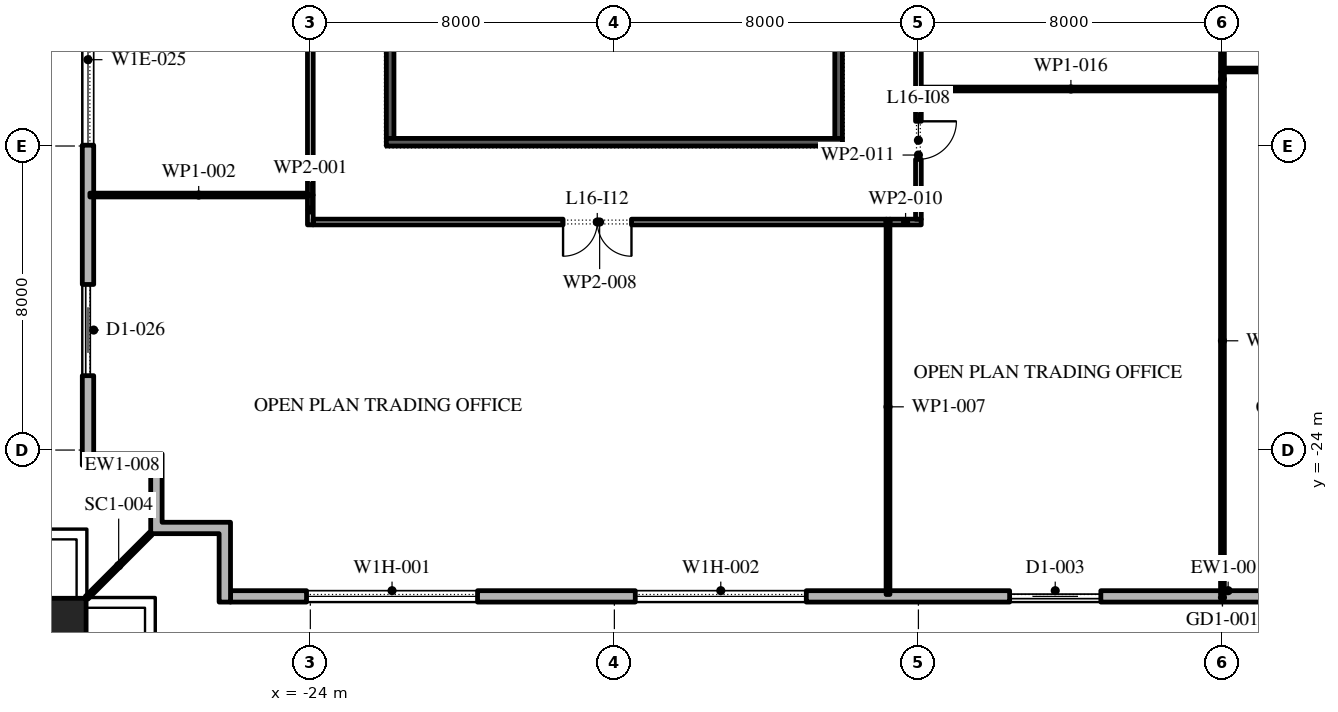
"""IFC4 building model, lengths in metres.
Left out: names, types, materials, properties, quantities, classifications, styles, units other than length and angle.
Written with IfcOpenShell. Run it as: python <this file> out.ifc"""

import sys

from ifc_helpers import new_model, si_unit, direction, frame, frame_2d, origin, origin_2d, place, context, subcontext, project, spatial, polyline, rectangle, outline, extrude, element, fill, save


model = new_model("IFC4")
c1 = context("Model", 3, precision=1e-05, world=origin(), true_north=direction((0.0, 1.0)))
c2 = subcontext(c1, "Body", "Model", "MODEL_VIEW")
j1 = project(units=[si_unit("LENGTHUNIT", "METRE"), si_unit("PLANEANGLEUNIT", "RADIAN")], contexts=[c1])
p1 = place(None, origin())
s1 = spatial("IfcSite", under=j1, at=p1, CompositionType="ELEMENT")
p2 = place(p1, origin())
s2 = spatial("IfcBuilding", under=s1, at=p2, CompositionType="ELEMENT")
p3 = place(p2, frame((0.0, 0.0, 77.4)))
s3 = spatial("IfcBuildingStorey", under=s2, at=p3, CompositionType="ELEMENT", Elevation=77.4)
p4 = place(p3, frame((-30.6, -28.6, 0.0), z_axis=(0.0, 0.0, 1.0), x_axis=(1.0, 0.0, 0.0)))
e1 = element("IfcColumn", 1, at=p4, inside=s3, PredefinedType="COLUMN", context=c2, shape_type="SweptSolid", body=[
    extrude(rectangle(XDim=1.4, YDim=1.4, at=origin_2d()), origin(), (0.0, 0.0, 1.0), 4.2),
])
p5 = place(p3, frame((-26.1, -27.85, 0.0), z_axis=(0.0, 0.0, 1.0), x_axis=(1.0, 0.0, 0.0)))
e2 = element("IfcWall", 2, at=p5, inside=s3, PredefinedType="STANDARD", context=c2, shape_type="SweptSolid", body=[
    extrude(rectangle(XDim=52.5, YDim=0.3, at=frame_2d((26.25, 0.0))), origin(), (0.0, 0.0, 1.0), 4.0),
])
p6 = place(p5, frame((2.0, 0.0, 0.45)))
e3 = element("IfcOpeningElement", 3, at=p6, cuts=e2, PredefinedType="OPENING", context=c2, shape_type="SweptSolid", body=[
    extrude(rectangle(XDim=4.5, YDim=2.75, at=frame_2d((2.25, 1.375))), frame((0.0, 0.16, 0.0), z_axis=(0.0, -1.0, 0.0), x_axis=(1.0, 0.0, 0.0)), (0.0, 0.0, 1.0), 0.32),
])
p7 = place(p5, frame((10.65, 0.0, 0.45)))
e4 = element("IfcOpeningElement", 4, at=p7, cuts=e2, PredefinedType="OPENING", context=c2, shape_type="SweptSolid", body=[
    extrude(rectangle(XDim=4.5, YDim=2.75, at=frame_2d((2.25, 1.375))), frame((0.0, 0.16, 0.0), z_axis=(0.0, -1.0, 0.0), x_axis=(1.0, 0.0, 0.0)), (0.0, 0.0, 1.0), 0.32),
])
p8 = place(p5, frame((20.5, 0.0, 0.0)))
e5 = element("IfcOpeningElement", 5, at=p8, cuts=e2, PredefinedType="OPENING", context=c2, shape_type="SweptSolid", body=[
    extrude(rectangle(XDim=2.4, YDim=3.5, at=frame_2d((1.2, 1.75))), frame((0.0, 0.16, 0.0), z_axis=(0.0, -1.0, 0.0), x_axis=(1.0, 0.0, 0.0)), (0.0, 0.0, 1.0), 0.32),
])
p9 = place(p5, frame((28.25, 0.0, 0.45)))
e6 = element("IfcOpeningElement", 6, at=p9, cuts=e2, PredefinedType="OPENING", context=c2, shape_type="SweptSolid", body=[
    extrude(rectangle(XDim=4.5, YDim=2.75, at=frame_2d((2.25, 1.375))), frame((0.0, 0.16, 0.0), z_axis=(0.0, -1.0, 0.0), x_axis=(1.0, 0.0, 0.0)), (0.0, 0.0, 1.0), 0.32),
])
p10 = place(p5, frame((37.05, 0.0, 0.45)))
e7 = element("IfcOpeningElement", 7, at=p10, cuts=e2, PredefinedType="OPENING", context=c2, shape_type="SweptSolid", body=[
    extrude(rectangle(XDim=4.5, YDim=2.75, at=frame_2d((2.25, 1.375))), frame((0.0, 0.16, 0.0), z_axis=(0.0, -1.0, 0.0), x_axis=(1.0, 0.0, 0.0)), (0.0, 0.0, 1.0), 0.32),
])
p11 = place(p5, frame((45.85, 0.0, 0.45)))
e8 = element("IfcOpeningElement", 8, at=p11, cuts=e2, PredefinedType="OPENING", context=c2, shape_type="SweptSolid", body=[
    extrude(rectangle(XDim=4.5, YDim=2.75, at=frame_2d((2.25, 1.375))), frame((0.0, 0.16, 0.0), z_axis=(0.0, -1.0, 0.0), x_axis=(1.0, 0.0, 0.0)), (0.0, 0.0, 1.0), 0.32),
])
p12 = place(p3, frame((-29.85, 25.1, 0.0), z_axis=(0.0, 0.0, 1.0), x_axis=(0.0, -1.0, 0.0)))
e9 = element("IfcWall", 9, at=p12, inside=s3, PredefinedType="STANDARD", context=c2, shape_type="SweptSolid", body=[
    extrude(rectangle(XDim=49.5, YDim=0.3, at=frame_2d((24.75, 0.0))), origin(), (0.0, 0.0, 1.0), 4.0),
])
p13 = place(p12, frame((1.157, 0.0, 0.45)))
e10 = element("IfcOpeningElement", 10, at=p13, cuts=e9, PredefinedType="OPENING", context=c2, shape_type="SweptSolid", body=[
    extrude(rectangle(XDim=4.5, YDim=2.875, at=frame_2d((2.25, 1.438))), frame((0.0, 0.16, 0.0), z_axis=(0.0, -1.0, 0.0), x_axis=(1.0, 0.0, 0.0)), (0.0, 0.0, 1.0), 0.32),
])
p14 = place(p12, frame((8.121, 0.0, 0.45)))
e11 = element("IfcOpeningElement", 11, at=p14, cuts=e9, PredefinedType="OPENING", context=c2, shape_type="SweptSolid", body=[
    extrude(rectangle(XDim=4.5, YDim=3.05, at=frame_2d((2.25, 1.525))), frame((0.0, 0.16, 0.0), z_axis=(0.0, -1.0, 0.0), x_axis=(1.0, 0.0, 0.0)), (0.0, 0.0, 1.0), 0.32),
])
p15 = place(p12, frame((16.286, 0.0, 0.0)))
e12 = element("IfcOpeningElement", 12, at=p15, cuts=e9, PredefinedType="OPENING", context=c2, shape_type="SweptSolid", body=[
    extrude(rectangle(XDim=2.4, YDim=3.325, at=frame_2d((1.2, 1.663))), frame((0.0, 0.16, 0.0), z_axis=(0.0, -1.0, 0.0), x_axis=(1.0, 0.0, 0.0)), (0.0, 0.0, 1.0), 0.32),
])
p16 = place(p12, frame((22.35, 0.0, 0.45)))
e13 = element("IfcOpeningElement", 13, at=p16, cuts=e9, PredefinedType="OPENING", context=c2, shape_type="SweptSolid", body=[
    extrude(rectangle(XDim=4.5, YDim=2.875, at=frame_2d((2.25, 1.438))), frame((0.0, 0.16, 0.0), z_axis=(0.0, -1.0, 0.0), x_axis=(1.0, 0.0, 0.0)), (0.0, 0.0, 1.0), 0.32),
])
p17 = place(p12, frame((29.464, 0.0, 0.45)))
e14 = element("IfcOpeningElement", 14, at=p17, cuts=e9, PredefinedType="OPENING", context=c2, shape_type="SweptSolid", body=[
    extrude(rectangle(XDim=4.5, YDim=2.875, at=frame_2d((2.25, 1.438))), frame((0.0, 0.16, 0.0), z_axis=(0.0, -1.0, 0.0), x_axis=(1.0, 0.0, 0.0)), (0.0, 0.0, 1.0), 0.32),
])
p18 = place(p12, frame((36.579, 0.0, 0.45)))
e15 = element("IfcOpeningElement", 15, at=p18, cuts=e9, PredefinedType="OPENING", context=c2, shape_type="SweptSolid", body=[
    extrude(rectangle(XDim=4.5, YDim=2.825, at=frame_2d((2.25, 1.413))), frame((0.0, 0.16, 0.0), z_axis=(0.0, -1.0, 0.0), x_axis=(1.0, 0.0, 0.0)), (0.0, 0.0, 1.0), 0.32),
])
p19 = place(p12, frame((44.743, 0.0, 0.0)))
e16 = element("IfcOpeningElement", 16, at=p19, cuts=e9, PredefinedType="OPENING", context=c2, shape_type="SweptSolid", body=[
    extrude(rectangle(XDim=2.4, YDim=3.5, at=frame_2d((1.2, 1.75))), frame((0.0, 0.16, 0.0), z_axis=(0.0, -1.0, 0.0), x_axis=(1.0, 0.0, 0.0)), (0.0, 0.0, 1.0), 0.32),
])
p20 = place(p3, origin())
e17 = element("IfcWall", 17, at=p20, inside=s3, PredefinedType="STANDARD", context=c2, shape_type="SweptSolid", body=[
    extrude(outline(polyline([(-26.4, -26.2), (-28.2, -26.2), (-28.2, -24.4), (-29.7, -24.4), (-29.7, -24.1), (-27.9, -24.1), (-27.9, -25.9), (-26.1, -25.9), (-26.1, -28.0), (-26.4, -28.0), (-26.4, -26.2)])), origin(), (0.0, 0.0, 1.0), 4.0),
])
p21 = place(p3, frame((-28.2, -26.2, -0.05), z_axis=(0.0, 0.0, 1.0), x_axis=(-0.707106781187, -0.707106781187, 0.0)))
e18 = element("IfcWall", 18, at=p21, inside=s3, PredefinedType="STANDARD", context=c2, shape_type="SweptSolid", body=[
    extrude(rectangle(XDim=2.385, YDim=0.1, at=frame_2d((1.192, 0.0))), origin(), (0.0, 0.0, 1.0), 4.05),
])
p22 = place(p3, frame((-21.9, -15.8, 0.0), z_axis=(0.0, 0.0, 1.0), x_axis=(0.0, 1.0, 0.0)))
e19 = element("IfcWall", 19, at=p22, inside=s3, PredefinedType="SHEAR", context=c2, shape_type="SweptSolid", body=[
    extrude(rectangle(XDim=13.05, YDim=0.2, at=frame_2d((6.525, 0.0))), origin(), (0.0, 0.0, 1.0), 4.0),
])
p23 = place(p22, frame((11.087, 0.0, 0.0)))
e20 = element("IfcOpeningElement", 20, at=p23, cuts=e19, PredefinedType="OPENING", context=c2, shape_type="SweptSolid", body=[
    extrude(rectangle(XDim=0.9, YDim=2.1, at=frame_2d((0.45, 1.05))), frame((0.0, 0.11, 0.0), z_axis=(0.0, -1.0, 0.0), x_axis=(1.0, 0.0, 0.0)), (0.0, 0.0, 1.0), 0.22),
])
p24 = place(p3, frame((-10.1, -15.8, 0.0), z_axis=(0.0, 0.0, 1.0), x_axis=(0.0, 1.0, 0.0)))
e21 = element("IfcWall", 21, at=p24, inside=s3, PredefinedType="SHEAR", context=c2, shape_type="SweptSolid", body=[
    extrude(rectangle(XDim=13.05, YDim=0.2, at=frame_2d((6.525, 0.0))), origin(), (0.0, 0.0, 1.0), 4.0),
])
p25 = place(p24, frame((4.488, 0.0, 0.0)))
e22 = element("IfcOpeningElement", 22, at=p25, cuts=e21, PredefinedType="OPENING", context=c2, shape_type="SweptSolid", body=[
    extrude(rectangle(XDim=0.9, YDim=2.1, at=frame_2d((0.45, 1.05))), frame((0.0, 0.11, 0.0), z_axis=(0.0, -1.0, 0.0), x_axis=(1.0, 0.0, 0.0)), (0.0, 0.0, 1.0), 0.22),
])
p26 = place(p24, frame((11.038, 0.0, 0.0)))
e23 = element("IfcOpeningElement", 23, at=p26, cuts=e21, PredefinedType="OPENING", context=c2, shape_type="SweptSolid", body=[
    extrude(rectangle(XDim=1.0, YDim=2.1, at=frame_2d((0.5, 1.05))), frame((0.0, 0.11, 0.0), z_axis=(0.0, -1.0, 0.0), x_axis=(1.0, 0.0, 0.0)), (0.0, 0.0, 1.0), 0.22),
])
p27 = place(p3, frame((-22.0, -15.9, 0.0), z_axis=(0.0, 0.0, 1.0), x_axis=(1.0, 0.0, 0.0)))
e24 = element("IfcWall", 24, at=p27, inside=s3, PredefinedType="SHEAR", context=c2, shape_type="SweptSolid", body=[
    extrude(rectangle(XDim=12.0, YDim=0.2, at=frame_2d((6.0, 0.0))), origin(), (0.0, 0.0, 1.0), 4.0),
])
p28 = place(p3, frame((-24.0, -18.075, 0.0), z_axis=(0.0, 0.0, 1.0), x_axis=(0.0, 1.0, 0.0)))
e25 = element("IfcWall", 25, at=p28, inside=s3, PredefinedType="PARTITIONING", context=c2, shape_type="SweptSolid", body=[
    extrude(rectangle(XDim=0.785, YDim=0.15, at=frame_2d((0.393, 0.0))), origin(), (0.0, 0.0, 1.0), 4.0),
])
p29 = place(p3, frame((-24.075, -17.29, 0.0), z_axis=(0.0, 0.0, 1.0), x_axis=(-1.0, 0.0, 0.0)))
e26 = element("IfcWall", 26, at=p29, inside=s3, PredefinedType="PARTITIONING", context=c2, shape_type="SweptSolid", body=[
    extrude(rectangle(XDim=5.725, YDim=0.1, at=frame_2d((2.863, 0.0))), origin(), (0.0, 0.0, 1.0), 4.0),
])
p30 = place(p3, frame((-24.0, -17.29, 0.0), z_axis=(0.0, 0.0, 1.0), x_axis=(0.0, 1.0, 0.0)))
e27 = element("IfcWall", 27, at=p30, inside=s3, PredefinedType="PARTITIONING", context=c2, shape_type="SweptSolid", body=[
    extrude(rectangle(XDim=14.23, YDim=0.15, at=frame_2d((7.115, 0.0))), origin(), (0.0, 0.0, 1.0), 4.0),
])
p31 = place(p30, frame((5.08, 0.0, 0.0)))
e28 = element("IfcOpeningElement", 28, at=p31, cuts=e27, PredefinedType="OPENING", context=c2, shape_type="SweptSolid", body=[
    extrude(rectangle(XDim=1.0, YDim=2.1, at=frame_2d((0.5, 1.05))), frame((0.0, 0.085, 0.0), z_axis=(0.0, -1.0, 0.0), x_axis=(1.0, 0.0, 0.0)), (0.0, 0.0, 1.0), 0.17),
])
p32 = place(p3, frame((-8.8, -27.8, 0.0), z_axis=(0.0, 0.0, 1.0), x_axis=(0.0, 1.0, 0.0)))
e29 = element("IfcWall", 29, at=p32, inside=s3, PredefinedType="PARTITIONING", context=c2, shape_type="SweptSolid", body=[
    extrude(rectangle(XDim=9.875, YDim=0.1, at=frame_2d((4.938, 0.0))), origin(), (0.0, 0.0, 1.0), 4.0),
])
p33 = place(p3, frame((-8.85, -18.0, 0.0), z_axis=(0.0, 0.0, 1.0), x_axis=(-1.0, 0.0, 0.0)))
e30 = element("IfcWall", 30, at=p33, inside=s3, PredefinedType="PARTITIONING", context=c2, shape_type="SweptSolid", body=[
    extrude(rectangle(XDim=15.075, YDim=0.15, at=frame_2d((7.538, 0.0))), origin(), (0.0, 0.0, 1.0), 4.0),
])
p34 = place(p33, frame((6.7, 0.0, 0.0)))
e31 = element("IfcOpeningElement", 31, at=p34, cuts=e30, PredefinedType="OPENING", context=c2, shape_type="SweptSolid", body=[
    extrude(rectangle(XDim=1.8, YDim=2.1, at=frame_2d((0.9, 1.05))), frame((0.0, 0.085, 0.0), z_axis=(0.0, -1.0, 0.0), x_axis=(1.0, 0.0, 0.0)), (0.0, 0.0, 1.0), 0.17),
])
p35 = place(p3, frame((-7.925, -18.0, 0.0), z_axis=(0.0, 0.0, 1.0), x_axis=(-1.0, 0.0, 0.0)))
e32 = element("IfcWall", 32, at=p35, inside=s3, PredefinedType="PARTITIONING", context=c2, shape_type="SweptSolid", body=[
    extrude(rectangle(XDim=0.825, YDim=0.15, at=frame_2d((0.413, 0.0))), origin(), (0.0, 0.0, 1.0), 4.0),
])
p36 = place(p3, frame((-8.0, -14.55, 0.0), z_axis=(0.0, 0.0, 1.0), x_axis=(0.0, -1.0, 0.0)))
e33 = element("IfcWall", 33, at=p36, inside=s3, PredefinedType="PARTITIONING", context=c2, shape_type="SweptSolid", body=[
    extrude(rectangle(XDim=3.375, YDim=0.15, at=frame_2d((1.688, 0.0))), origin(), (0.0, 0.0, 1.0), 4.0),
])
p37 = place(p36, frame((0.8, 0.0, 0.0)))
e34 = element("IfcOpeningElement", 34, at=p37, cuts=e33, PredefinedType="OPENING", context=c2, shape_type="SweptSolid", body=[
    extrude(rectangle(XDim=1.0, YDim=2.1, at=frame_2d((0.5, 1.05))), frame((0.0, 0.085, 0.0), z_axis=(0.0, -1.0, 0.0), x_axis=(1.0, 0.0, 0.0)), (0.0, 0.0, 1.0), 0.17),
])
p38 = place(p3, frame((-8.0, -4.925, 0.0), z_axis=(0.0, 0.0, 1.0), x_axis=(0.0, -1.0, 0.0)))
e35 = element("IfcWall", 35, at=p38, inside=s3, PredefinedType="PARTITIONING", context=c2, shape_type="SweptSolid", body=[
    extrude(rectangle(XDim=9.625, YDim=0.15, at=frame_2d((4.812, 0.0))), origin(), (0.0, 0.0, 1.0), 4.0),
])
p39 = place(p38, frame((6.175, 0.0, 0.0)))
e36 = element("IfcOpeningElement", 36, at=p39, cuts=e35, PredefinedType="OPENING", context=c2, shape_type="SweptSolid", body=[
    extrude(rectangle(XDim=1.0, YDim=2.1, at=frame_2d((0.5, 1.05))), frame((0.0, 0.085, 0.0), z_axis=(0.0, -1.0, 0.0), x_axis=(1.0, 0.0, 0.0)), (0.0, 0.0, 1.0), 0.17),
])
p40 = place(p3, frame((0.0, -27.8, 0.0), z_axis=(0.0, 0.0, 1.0), x_axis=(0.0, 1.0, 0.0)))
e37 = element("IfcWall", 37, at=p40, inside=s3, PredefinedType="PARTITIONING", context=c2, shape_type="SweptSolid", body=[
    extrude(rectangle(XDim=13.35, YDim=0.1, at=frame_2d((6.675, 0.0))), origin(), (0.0, 0.0, 1.0), 4.0),
])
p41 = place(p3, frame((-0.05, -14.5, 0.0), z_axis=(0.0, 0.0, 1.0), x_axis=(-1.0, 0.0, 0.0)))
e38 = element("IfcWall", 38, at=p41, inside=s3, PredefinedType="PARTITIONING", context=c2, shape_type="SweptSolid", body=[
    extrude(rectangle(XDim=7.875, YDim=0.1, at=frame_2d((3.938, 0.0))), origin(), (0.0, 0.0, 1.0), 4.0),
])
p42 = place(p3, frame((0.0, -14.45, 0.0), z_axis=(0.0, 0.0, 1.0), x_axis=(0.0, 1.0, 0.0)))
e39 = element("IfcWall", 39, at=p42, inside=s3, PredefinedType="PARTITIONING", context=c2, shape_type="SweptSolid", body=[
    extrude(rectangle(XDim=0.4, YDim=0.1, at=frame_2d((0.2, 0.0))), origin(), (0.0, 0.0, 1.0), 4.0),
])
p43 = place(p3, frame((0.0, -14.05, 0.0), z_axis=(0.0, 0.0, 1.0), x_axis=(0.0, 1.0, 0.0)))
e40 = element("IfcWall", 40, at=p43, inside=s3, PredefinedType="PARTITIONING", context=c2, shape_type="SweptSolid", body=[
    extrude(rectangle(XDim=9.125, YDim=0.1, at=frame_2d((4.562, 0.0))), origin(), (0.0, 0.0, 1.0), 4.0),
])
p44 = place(p3, frame((0.05, -14.0, 0.0), z_axis=(0.0, 0.0, 1.0), x_axis=(1.0, 0.0, 0.0)))
e41 = element("IfcWall", 41, at=p44, inside=s3, PredefinedType="PARTITIONING", context=c2, shape_type="SweptSolid", body=[
    extrude(rectangle(XDim=8.025, YDim=0.1, at=frame_2d((4.012, 0.0))), origin(), (0.0, 0.0, 1.0), 4.0),
])
p45 = place(p6, origin())
e42 = element("IfcWindow", 42, at=p45, inside=s3, PartitioningType="DOUBLE_PANEL_VERTICAL", PredefinedType="WINDOW", context=c2, shape_type="SweptSolid", body=[
    extrude(rectangle(XDim=4.5, YDim=2.75, at=frame_2d((2.25, 1.375))), frame((0.0, 0.03, 0.0), z_axis=(0.0, -1.0, 0.0), x_axis=(1.0, 0.0, 0.0)), (0.0, 0.0, 1.0), 0.06),
])
fill(e3, e42)
p46 = place(p7, origin())
e43 = element("IfcWindow", 43, at=p46, inside=s3, PartitioningType="DOUBLE_PANEL_VERTICAL", PredefinedType="WINDOW", context=c2, shape_type="SweptSolid", body=[
    extrude(rectangle(XDim=4.5, YDim=2.75, at=frame_2d((2.25, 1.375))), frame((0.0, 0.03, 0.0), z_axis=(0.0, -1.0, 0.0), x_axis=(1.0, 0.0, 0.0)), (0.0, 0.0, 1.0), 0.06),
])
fill(e4, e43)
p47 = place(p8, origin())
e44 = element("IfcDoor", 44, at=p47, inside=s3, OperationType="DOUBLE_DOOR_SLIDING", PredefinedType="DOOR", context=c2, shape_type="SweptSolid", body=[
    extrude(rectangle(XDim=2.4, YDim=3.5, at=frame_2d((1.2, 1.75))), frame((0.0, 0.025, 0.0), z_axis=(0.0, -1.0, 0.0), x_axis=(1.0, 0.0, 0.0)), (0.0, 0.0, 1.0), 0.05),
])
fill(e5, e44)
p48 = place(p18, origin())
e45 = element("IfcWindow", 45, at=p48, inside=s3, PartitioningType="DOUBLE_PANEL_VERTICAL", PredefinedType="WINDOW", context=c2, shape_type="SweptSolid", body=[
    extrude(rectangle(XDim=4.5, YDim=2.825, at=frame_2d((2.25, 1.413))), frame((0.0, 0.03, 0.0), z_axis=(0.0, -1.0, 0.0), x_axis=(1.0, 0.0, 0.0)), (0.0, 0.0, 1.0), 0.06),
])
fill(e15, e45)
p49 = place(p19, origin())
e46 = element("IfcDoor", 46, at=p49, inside=s3, OperationType="DOUBLE_DOOR_SLIDING", PredefinedType="DOOR", context=c2, shape_type="SweptSolid", body=[
    extrude(rectangle(XDim=2.4, YDim=3.5, at=frame_2d((1.2, 1.75))), frame((0.0, 0.025, 0.0), z_axis=(0.0, -1.0, 0.0), x_axis=(1.0, 0.0, 0.0)), (0.0, 0.0, 1.0), 0.05),
])
fill(e16, e46)
p50 = place(p37, origin())
e47 = element("IfcDoor", 47, at=p50, inside=s3, OperationType="SINGLE_SWING_RIGHT", PredefinedType="DOOR", context=c2, shape_type="SweptSolid", body=[
    extrude(rectangle(XDim=1.0, YDim=2.1, at=frame_2d((0.5, 1.05))), frame((0.0, 0.025, 0.0), z_axis=(0.0, -1.0, 0.0), x_axis=(1.0, 0.0, 0.0)), (0.0, 0.0, 1.0), 0.05),
])
fill(e34, e47)
p51 = place(p34, origin())
e48 = element("IfcDoor", 48, at=p51, inside=s3, OperationType="SINGLE_SWING_LEFT", PredefinedType="DOOR", context=c2, shape_type="SweptSolid", body=[
    extrude(rectangle(XDim=1.8, YDim=2.1, at=frame_2d((0.9, 1.05))), frame((0.0, 0.025, 0.0), z_axis=(0.0, -1.0, 0.0), x_axis=(1.0, 0.0, 0.0)), (0.0, 0.0, 1.0), 0.05),
])
fill(e31, e48)
save(model, sys.argv[1])
